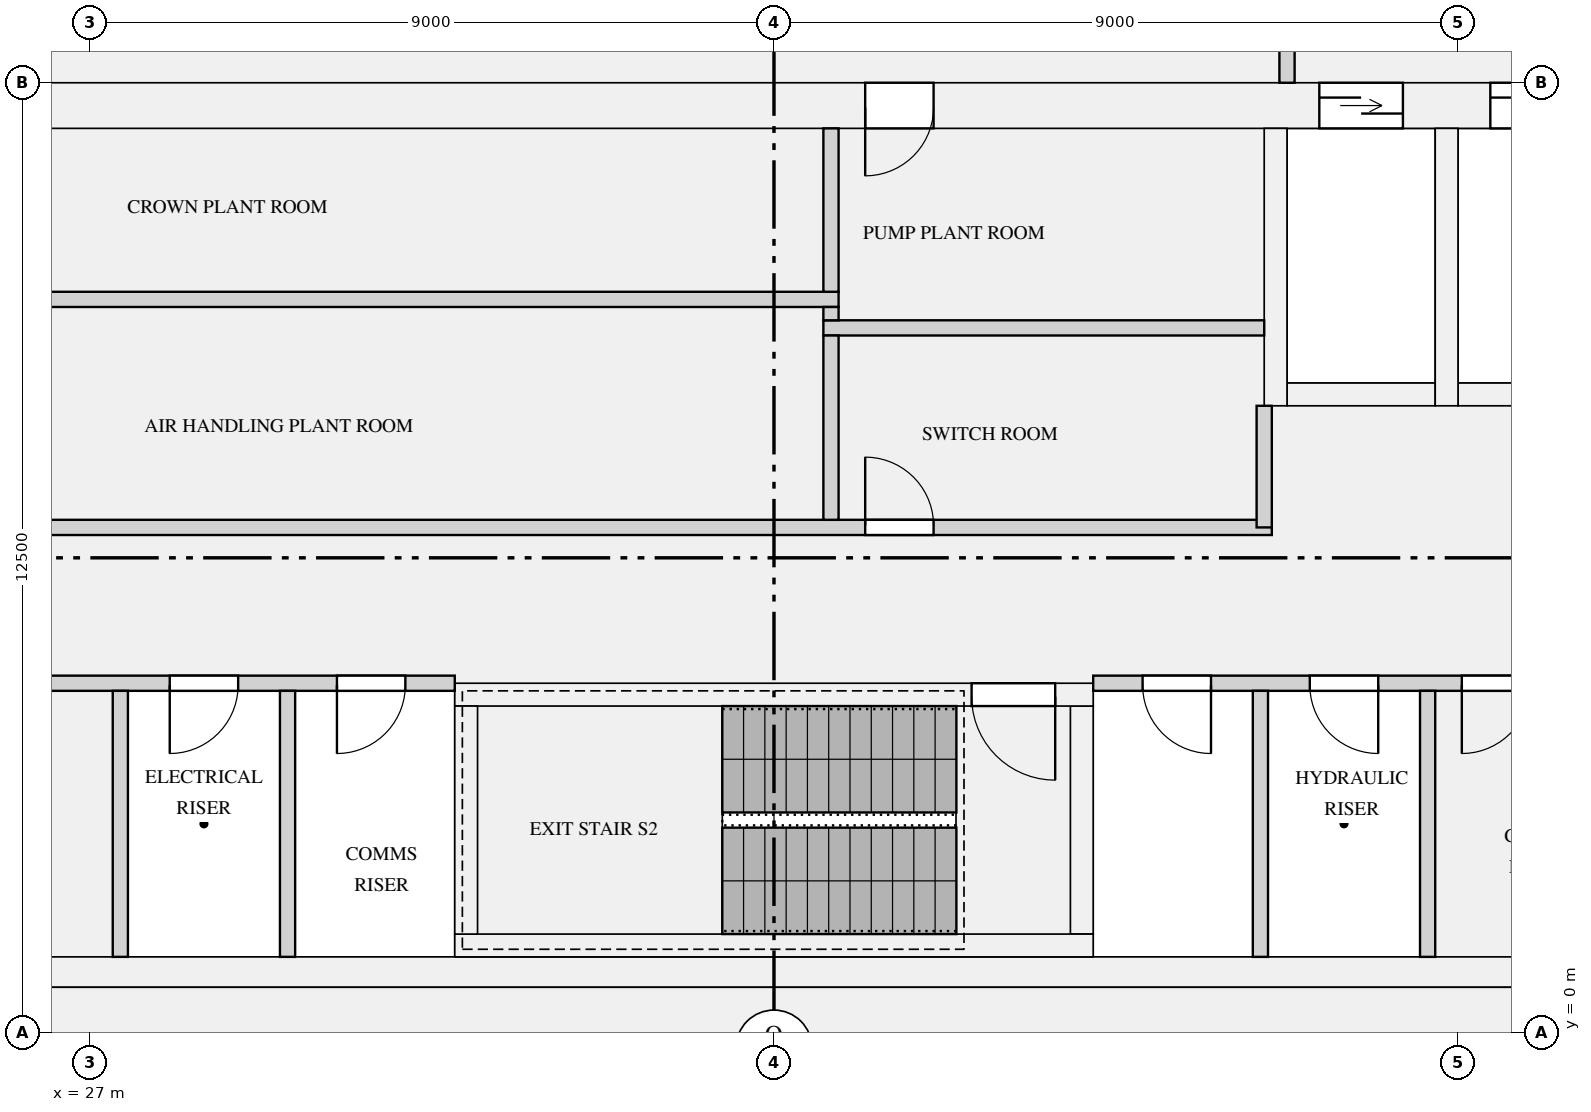
"""IFC4 building model, lengths in metres.
Left out: names, types, materials, properties, quantities, classifications, styles, units other than length and angle.
Written with IfcOpenShell. Run it as: python <this file> out.ifc"""

import sys

from ifc_helpers import new_model, si_unit, direction, frame, frame_2d, origin, place, context, subcontext, project, spatial, rectangle, extrude, element, fill, save


model = new_model("IFC4")
c1 = context("Model", 3, precision=1e-05, world=origin(), true_north=direction((0.0, 1.0)))
c2 = subcontext(c1, "Body", "Model", "MODEL_VIEW")
j1 = project(units=[si_unit("LENGTHUNIT", "METRE"), si_unit("PLANEANGLEUNIT", "RADIAN")], contexts=[c1])
p1 = place(None, origin())
s1 = spatial("IfcSite", under=j1, at=p1, CompositionType="ELEMENT")
p2 = place(p1, origin())
s2 = spatial("IfcBuilding", under=s1, at=p2, CompositionType="ELEMENT")
p3 = place(p2, frame((0.0, 0.0, 235.8)))
s3 = spatial("IfcBuildingStorey", under=s2, at=p3, CompositionType="ELEMENT", Elevation=235.8)
p4 = place(p3, frame((18.6, 0.3, 0.0), z_axis=(0.0, 0.0, 1.0), x_axis=(1.0, 0.0, 0.0)))
e1 = element("IfcWall", 1, at=p4, inside=s3, PredefinedType="SHEAR", context=c2, shape_type="SweptSolid", body=[
    extrude(rectangle(XDim=34.8, YDim=0.6, at=frame_2d((17.4, 0.0))), origin(), (0.0, 0.0, 1.0), 4.2),
])
p5 = place(p3, frame((18.6, 12.2, 0.0), z_axis=(0.0, 0.0, 1.0), x_axis=(1.0, 0.0, 0.0)))
e2 = element("IfcWall", 2, at=p5, inside=s3, PredefinedType="SHEAR", context=c2, shape_type="SweptSolid", body=[
    extrude(rectangle(XDim=34.8, YDim=0.6, at=frame_2d((17.4, 0.0))), origin(), (0.0, 0.0, 1.0), 4.2),
])
p6 = place(p5, frame((24.575, 0.0, 0.0)))
e3 = element("IfcOpeningElement", 3, at=p6, cuts=e2, PredefinedType="OPENING", context=c2, shape_type="SweptSolid", body=[
    extrude(rectangle(XDim=1.1, YDim=2.1, at=frame_2d((0.55, 1.05))), frame((0.0, 0.31, 0.0), z_axis=(0.0, -1.0, 0.0), x_axis=(1.0, 0.0, 0.0)), (0.0, 0.0, 1.0), 0.62),
])
p7 = place(p5, frame((26.825, 0.0, 0.0)))
e4 = element("IfcOpeningElement", 4, at=p7, cuts=e2, PredefinedType="OPENING", context=c2, shape_type="SweptSolid", body=[
    extrude(rectangle(XDim=1.1, YDim=2.1, at=frame_2d((0.55, 1.05))), frame((0.0, 0.31, 0.0), z_axis=(0.0, -1.0, 0.0), x_axis=(1.0, 0.0, 0.0)), (0.0, 0.0, 1.0), 0.62),
])
p8 = place(p5, frame((29.075, 0.0, 0.0)))
e5 = element("IfcOpeningElement", 5, at=p8, cuts=e2, PredefinedType="OPENING", context=c2, shape_type="SweptSolid", body=[
    extrude(rectangle(XDim=1.1, YDim=2.1, at=frame_2d((0.55, 1.05))), frame((0.0, 0.31, 0.0), z_axis=(0.0, -1.0, 0.0), x_axis=(1.0, 0.0, 0.0)), (0.0, 0.0, 1.0), 0.62),
])
p9 = place(p5, frame((18.6, 0.0, 0.0)))
e6 = element("IfcOpeningElement", 6, at=p9, cuts=e2, PredefinedType="OPENING", context=c2, shape_type="SweptSolid", body=[
    extrude(rectangle(XDim=0.9, YDim=2.1, at=frame_2d((0.45, 1.05))), frame((0.0, 0.31, 0.0), z_axis=(0.0, -1.0, 0.0), x_axis=(1.0, 0.0, 0.0)), (0.0, 0.0, 1.0), 0.62),
])
p10 = place(p5, frame((4.65, 0.0, 0.0)))
e7 = element("IfcOpeningElement", 7, at=p10, cuts=e2, PredefinedType="OPENING", context=c2, shape_type="SweptSolid", body=[
    extrude(rectangle(XDim=0.9, YDim=2.1, at=frame_2d((0.45, 1.05))), frame((0.0, 0.31, 0.0), z_axis=(0.0, -1.0, 0.0), x_axis=(1.0, 0.0, 0.0)), (0.0, 0.0, 1.0), 0.62),
])
p11 = place(p5, frame((1.55, 0.0, 0.0)))
e8 = element("IfcOpeningElement", 8, at=p11, cuts=e2, PredefinedType="OPENING", context=c2, shape_type="SweptSolid", body=[
    extrude(rectangle(XDim=1.2, YDim=2.1, at=frame_2d((0.6, 1.05))), frame((0.0, 0.31, 0.0), z_axis=(0.0, -1.0, 0.0), x_axis=(1.0, 0.0, 0.0)), (0.0, 0.0, 1.0), 0.62),
])
p12 = place(p5, frame((32.05, 0.0, 0.0)))
e9 = element("IfcOpeningElement", 9, at=p12, cuts=e2, PredefinedType="OPENING", context=c2, shape_type="SweptSolid", body=[
    extrude(rectangle(XDim=1.2, YDim=2.1, at=frame_2d((0.6, 1.05))), frame((0.0, 0.31, 0.0), z_axis=(0.0, -1.0, 0.0), x_axis=(1.0, 0.0, 0.0)), (0.0, 0.0, 1.0), 0.62),
])
p13 = place(p3, frame((18.6, 0.8, 0.0), z_axis=(0.0, 0.0, 1.0), x_axis=(1.0, 0.0, 0.0)))
e10 = element("IfcWall", 10, at=p13, inside=s3, PredefinedType="SHEAR", context=c2, shape_type="SweptSolid", body=[
    extrude(rectangle(XDim=34.8, YDim=0.4, at=frame_2d((17.4, 0.0))), origin(), (0.0, 0.0, 1.0), 4.2),
])
p14 = place(p3, frame((42.75, 8.4, 0.0), z_axis=(0.0, 0.0, 1.0), x_axis=(1.0, 0.0, 0.0)))
e11 = element("IfcWall", 11, at=p14, inside=s3, PredefinedType="SHEAR", context=c2, shape_type="SweptSolid", body=[
    extrude(rectangle(XDim=1.95, YDim=0.3, at=frame_2d((0.975, 0.0))), origin(), (0.0, 0.0, 1.0), 4.2),
])
p15 = place(p3, frame((42.6, 8.25, 0.0), z_axis=(0.0, 0.0, 1.0), x_axis=(0.0, 1.0, 0.0)))
e12 = element("IfcWall", 12, at=p15, inside=s3, PredefinedType="SHEAR", context=c2, shape_type="SweptSolid", body=[
    extrude(rectangle(XDim=3.65, YDim=0.3, at=frame_2d((1.825, 0.0))), origin(), (0.0, 0.0, 1.0), 4.2),
])
p16 = place(p3, frame((45.0, 8.4, 0.0), z_axis=(0.0, 0.0, 1.0), x_axis=(1.0, 0.0, 0.0)))
e13 = element("IfcWall", 13, at=p16, inside=s3, PredefinedType="SHEAR", context=c2, shape_type="SweptSolid", body=[
    extrude(rectangle(XDim=1.95, YDim=0.3, at=frame_2d((0.975, 0.0))), origin(), (0.0, 0.0, 1.0), 4.2),
])
p17 = place(p3, frame((44.85, 8.25, 0.0), z_axis=(0.0, 0.0, 1.0), x_axis=(0.0, 1.0, 0.0)))
e14 = element("IfcWall", 14, at=p17, inside=s3, PredefinedType="SHEAR", context=c2, shape_type="SweptSolid", body=[
    extrude(rectangle(XDim=3.65, YDim=0.3, at=frame_2d((1.825, 0.0))), origin(), (0.0, 0.0, 1.0), 4.2),
])
p18 = place(p3, frame((31.8, 1.15, 0.0), z_axis=(0.0, 0.0, 1.0), x_axis=(1.0, 0.0, 0.0)))
e15 = element("IfcWall", 15, at=p18, inside=s3, PredefinedType="SHEAR", context=c2, shape_type="SweptSolid", body=[
    extrude(rectangle(XDim=8.4, YDim=0.3, at=frame_2d((4.2, 0.0))), origin(), (0.0, 0.0, 1.0), 4.2),
])
p19 = place(p3, frame((31.8, 4.45, 0.0), z_axis=(0.0, 0.0, 1.0), x_axis=(1.0, 0.0, 0.0)))
e16 = element("IfcWall", 16, at=p19, inside=s3, PredefinedType="SHEAR", context=c2, shape_type="SweptSolid", body=[
    extrude(rectangle(XDim=8.4, YDim=0.3, at=frame_2d((4.2, 0.0))), origin(), (0.0, 0.0, 1.0), 4.2),
])
p20 = place(p19, frame((6.8, 0.0, 0.0)))
e17 = element("IfcOpeningElement", 17, at=p20, cuts=e16, PredefinedType="OPENING", context=c2, shape_type="SweptSolid", body=[
    extrude(rectangle(XDim=1.1, YDim=2.1, at=frame_2d((0.55, 1.05))), frame((0.0, 0.16, 0.0), z_axis=(0.0, -1.0, 0.0), x_axis=(1.0, 0.0, 0.0)), (0.0, 0.0, 1.0), 0.32),
])
for number, where, z_axis, x_axis in (
    (18, (31.95, 1.3, 0.0), (0.0, 0.0, 1.0), (0.0, 1.0, 0.0)),
    (19, (40.05, 1.3, 0.0), (0.0, 0.0, 1.0), (0.0, 1.0, 0.0)),
):
    element("IfcWall", number, at=place(p3, frame(where, z_axis=z_axis, x_axis=x_axis)), inside=s3, PredefinedType="SHEAR", context=c2, shape_type="SweptSolid", body=[
        extrude(rectangle(XDim=3.0, YDim=0.3, at=frame_2d((1.5, 0.0))), origin(), (0.0, 0.0, 1.0), 4.2),
    ])
p21 = place(p3, frame((24.6, 4.6, 0.0), z_axis=(0.0, 0.0, 1.0), x_axis=(1.0, 0.0, 0.0)))
e20 = element("IfcWall", 20, at=p21, inside=s3, PredefinedType="PARTITIONING", context=c2, shape_type="SweptSolid", body=[
    extrude(rectangle(XDim=7.2, YDim=0.2, at=frame_2d((3.6, 0.0))), origin(), (0.0, 0.0, 1.0), 3.85),
])
p22 = place(p21, frame((0.55, 0.0, 0.0)))
e21 = element("IfcOpeningElement", 21, at=p22, cuts=e20, PredefinedType="OPENING", context=c2, shape_type="SweptSolid", body=[
    extrude(rectangle(XDim=0.9, YDim=2.1, at=frame_2d((0.45, 1.05))), frame((0.0, 0.11, 0.0), z_axis=(0.0, -1.0, 0.0), x_axis=(1.0, 0.0, 0.0)), (0.0, 0.0, 1.0), 0.22),
])
p23 = place(p21, frame((3.45, 0.0, 0.0)))
e22 = element("IfcOpeningElement", 22, at=p23, cuts=e20, PredefinedType="OPENING", context=c2, shape_type="SweptSolid", body=[
    extrude(rectangle(XDim=0.9, YDim=2.1, at=frame_2d((0.45, 1.05))), frame((0.0, 0.11, 0.0), z_axis=(0.0, -1.0, 0.0), x_axis=(1.0, 0.0, 0.0)), (0.0, 0.0, 1.0), 0.22),
])
p24 = place(p21, frame((5.65, 0.0, 0.0)))
e23 = element("IfcOpeningElement", 23, at=p24, cuts=e20, PredefinedType="OPENING", context=c2, shape_type="SweptSolid", body=[
    extrude(rectangle(XDim=0.9, YDim=2.1, at=frame_2d((0.45, 1.05))), frame((0.0, 0.11, 0.0), z_axis=(0.0, -1.0, 0.0), x_axis=(1.0, 0.0, 0.0)), (0.0, 0.0, 1.0), 0.22),
])
p25 = place(p3, frame((40.2, 4.6, 0.0), z_axis=(0.0, 0.0, 1.0), x_axis=(1.0, 0.0, 0.0)))
e24 = element("IfcWall", 24, at=p25, inside=s3, PredefinedType="PARTITIONING", context=c2, shape_type="SweptSolid", body=[
    extrude(rectangle(XDim=7.2, YDim=0.2, at=frame_2d((3.6, 0.0))), origin(), (0.0, 0.0, 1.0), 3.85),
])
p26 = place(p25, frame((4.85, 0.0, 0.0)))
e25 = element("IfcOpeningElement", 25, at=p26, cuts=e24, PredefinedType="OPENING", context=c2, shape_type="SweptSolid", body=[
    extrude(rectangle(XDim=0.9, YDim=2.1, at=frame_2d((0.45, 1.05))), frame((0.0, 0.11, 0.0), z_axis=(0.0, -1.0, 0.0), x_axis=(1.0, 0.0, 0.0)), (0.0, 0.0, 1.0), 0.22),
])
p27 = place(p25, frame((0.65, 0.0, 0.0)))
e26 = element("IfcOpeningElement", 26, at=p27, cuts=e24, PredefinedType="OPENING", context=c2, shape_type="SweptSolid", body=[
    extrude(rectangle(XDim=0.9, YDim=2.1, at=frame_2d((0.45, 1.05))), frame((0.0, 0.11, 0.0), z_axis=(0.0, -1.0, 0.0), x_axis=(1.0, 0.0, 0.0)), (0.0, 0.0, 1.0), 0.22),
])
p28 = place(p25, frame((2.85, 0.0, 0.0)))
e27 = element("IfcOpeningElement", 27, at=p28, cuts=e24, PredefinedType="OPENING", context=c2, shape_type="SweptSolid", body=[
    extrude(rectangle(XDim=0.9, YDim=2.1, at=frame_2d((0.45, 1.05))), frame((0.0, 0.11, 0.0), z_axis=(0.0, -1.0, 0.0), x_axis=(1.0, 0.0, 0.0)), (0.0, 0.0, 1.0), 0.22),
])
p29 = place(p3, frame((22.7, 6.65, 0.0), z_axis=(0.0, 0.0, 1.0), x_axis=(1.0, 0.0, 0.0)))
e28 = element("IfcWall", 28, at=p29, inside=s3, PredefinedType="PARTITIONING", context=c2, shape_type="SweptSolid", body=[
    extrude(rectangle(XDim=19.85, YDim=0.2, at=frame_2d((9.925, 0.0))), origin(), (0.0, 0.0, 1.0), 3.85),
])
p30 = place(p29, frame((14.5, 0.0, 0.0)))
e29 = element("IfcOpeningElement", 29, at=p30, cuts=e28, PredefinedType="OPENING", context=c2, shape_type="SweptSolid", body=[
    extrude(rectangle(XDim=0.9, YDim=2.1, at=frame_2d((0.45, 1.05))), frame((0.0, 0.11, 0.0), z_axis=(0.0, -1.0, 0.0), x_axis=(1.0, 0.0, 0.0)), (0.0, 0.0, 1.0), 0.22),
])
p31 = place(p29, frame((0.55, 0.0, 0.0)))
e30 = element("IfcOpeningElement", 30, at=p31, cuts=e28, PredefinedType="OPENING", context=c2, shape_type="SweptSolid", body=[
    extrude(rectangle(XDim=0.9, YDim=2.1, at=frame_2d((0.45, 1.05))), frame((0.0, 0.11, 0.0), z_axis=(0.0, -1.0, 0.0), x_axis=(1.0, 0.0, 0.0)), (0.0, 0.0, 1.0), 0.22),
])
p32 = place(p3, frame((36.65, 9.275, 0.0), z_axis=(0.0, 0.0, 1.0), x_axis=(1.0, 0.0, 0.0)))
e31 = element("IfcWall", 31, at=p32, inside=s3, PredefinedType="PARTITIONING", context=c2, shape_type="SweptSolid", body=[
    extrude(rectangle(XDim=5.8, YDim=0.2, at=frame_2d((2.9, 0.0))), origin(), (0.0, 0.0, 1.0), 3.85),
])
p33 = place(p3, frame((22.7, 9.65, 0.0), z_axis=(0.0, 0.0, 1.0), x_axis=(1.0, 0.0, 0.0)))
e32 = element("IfcWall", 32, at=p33, inside=s3, PredefinedType="PARTITIONING", context=c2, shape_type="SweptSolid", body=[
    extrude(rectangle(XDim=14.15, YDim=0.2, at=frame_2d((7.075, 0.0))), origin(), (0.0, 0.0, 1.0), 3.85),
])
for number, where, z_axis, x_axis in (
    (33, (27.4, 1.0, 0.0), (0.0, 0.0, 1.0), (0.0, 1.0, 0.0)),
    (34, (29.6, 1.0, 0.0), (0.0, 0.0, 1.0), (0.0, 1.0, 0.0)),
    (35, (42.4, 1.0, 0.0), (0.0, 0.0, 1.0), (0.0, 1.0, 0.0)),
    (36, (44.6, 1.0, 0.0), (0.0, 0.0, 1.0), (0.0, 1.0, 0.0)),
):
    element("IfcWall", number, at=place(p3, frame(where, z_axis=z_axis, x_axis=x_axis)), inside=s3, PredefinedType="PARTITIONING", context=c2, shape_type="SweptSolid", body=[
        extrude(rectangle(XDim=3.5, YDim=0.2, at=frame_2d((1.75, 0.0))), origin(), (0.0, 0.0, 1.0), 3.85),
    ])
p34 = place(p3, frame((42.45, 6.65, 0.0), z_axis=(0.0, 0.0, 1.0), x_axis=(0.0, 1.0, 0.0)))
e37 = element("IfcWall", 37, at=p34, inside=s3, PredefinedType="PARTITIONING", context=c2, shape_type="SweptSolid", body=[
    extrude(rectangle(XDim=1.6, YDim=0.2, at=frame_2d((0.8, 0.0))), origin(), (0.0, 0.0, 1.0), 3.85),
])
p35 = place(p3, frame((36.75, 6.75, 0.0), z_axis=(0.0, 0.0, 1.0), x_axis=(0.0, 1.0, 0.0)))
e38 = element("IfcWall", 38, at=p35, inside=s3, PredefinedType="PARTITIONING", context=c2, shape_type="SweptSolid", body=[
    extrude(rectangle(XDim=2.425, YDim=0.2, at=frame_2d((1.212, 0.0))), origin(), (0.0, 0.0, 1.0), 3.85),
])
p36 = place(p3, frame((36.75, 9.375, 0.0), z_axis=(0.0, 0.0, 1.0), x_axis=(0.0, 1.0, 0.0)))
e39 = element("IfcWall", 39, at=p36, inside=s3, PredefinedType="PARTITIONING", context=c2, shape_type="SweptSolid", body=[
    extrude(rectangle(XDim=0.175, YDim=0.2, at=frame_2d((0.087, 0.0))), origin(), (0.0, 0.0, 1.0), 3.85),
])
p37 = place(p3, frame((36.75, 9.75, 0.0), z_axis=(0.0, 0.0, 1.0), x_axis=(0.0, 1.0, 0.0)))
e40 = element("IfcWall", 40, at=p37, inside=s3, PredefinedType="PARTITIONING", context=c2, shape_type="SweptSolid", body=[
    extrude(rectangle(XDim=2.15, YDim=0.2, at=frame_2d((1.075, 0.0))), origin(), (0.0, 0.0, 1.0), 3.85),
])
p38 = place(p3, frame((42.75, 12.5, 0.0), z_axis=(0.0, 0.0, 1.0), x_axis=(0.0, 1.0, 0.0)))
e41 = element("IfcWall", 41, at=p38, inside=s3, PredefinedType="PARTITIONING", context=c2, shape_type="SweptSolid", body=[
    extrude(rectangle(XDim=3.4, YDim=0.2, at=frame_2d((1.7, 0.0))), origin(), (0.0, 0.0, 1.0), 3.85),
])
p39 = place(p38, frame((2.2, 0.0, 0.0)))
e42 = element("IfcOpeningElement", 42, at=p39, cuts=e41, PredefinedType="OPENING", context=c2, shape_type="SweptSolid", body=[
    extrude(rectangle(XDim=1.0, YDim=2.1, at=frame_2d((0.5, 1.05))), frame((0.0, 0.11, 0.0), z_axis=(0.0, -1.0, 0.0), x_axis=(1.0, 0.0, 0.0)), (0.0, 0.0, 1.0), 0.22),
])
p40 = place(p6, origin())
e43 = element("IfcDoor", 43, at=p40, inside=s3, OperationType="DOUBLE_DOOR_SLIDING", PredefinedType="DOOR", context=c2, shape_type="SweptSolid", body=[
    extrude(rectangle(XDim=1.1, YDim=2.1, at=frame_2d((0.55, 1.05))), frame((0.0, 0.025, 0.0), z_axis=(0.0, -1.0, 0.0), x_axis=(1.0, 0.0, 0.0)), (0.0, 0.0, 1.0), 0.05),
])
fill(e3, e43)
p41 = place(p7, origin())
e44 = element("IfcDoor", 44, at=p41, inside=s3, OperationType="DOUBLE_DOOR_SLIDING", PredefinedType="DOOR", context=c2, shape_type="SweptSolid", body=[
    extrude(rectangle(XDim=1.1, YDim=2.1, at=frame_2d((0.55, 1.05))), frame((0.0, 0.025, 0.0), z_axis=(0.0, -1.0, 0.0), x_axis=(1.0, 0.0, 0.0)), (0.0, 0.0, 1.0), 0.05),
])
fill(e4, e44)
p42 = place(p20, frame((1.1, 0.0, 0.0), z_axis=(0.0, 0.0, 1.0), x_axis=(-1.0, 0.0, 0.0)))
e45 = element("IfcDoor", 45, at=p42, inside=s3, OperationType="SINGLE_SWING_LEFT", PredefinedType="DOOR", context=c2, shape_type="SweptSolid", body=[
    extrude(rectangle(XDim=1.1, YDim=2.1, at=frame_2d((0.55, 1.05))), frame((0.0, 0.025, 0.0), z_axis=(0.0, -1.0, 0.0), x_axis=(1.0, 0.0, 0.0)), (0.0, 0.0, 1.0), 0.05),
])
fill(e17, e45)
p43 = place(p26, frame((0.9, 0.0, 0.0), z_axis=(0.0, 0.0, 1.0), x_axis=(-1.0, 0.0, 0.0)))
e46 = element("IfcDoor", 46, at=p43, inside=s3, OperationType="SINGLE_SWING_RIGHT", PredefinedType="DOOR", context=c2, shape_type="SweptSolid", body=[
    extrude(rectangle(XDim=0.9, YDim=2.1, at=frame_2d((0.45, 1.05))), frame((0.0, 0.025, 0.0), z_axis=(0.0, -1.0, 0.0), x_axis=(1.0, 0.0, 0.0)), (0.0, 0.0, 1.0), 0.05),
])
fill(e25, e46)
p44 = place(p30, origin())
e47 = element("IfcDoor", 47, at=p44, inside=s3, OperationType="SINGLE_SWING_LEFT", PredefinedType="DOOR", context=c2, shape_type="SweptSolid", body=[
    extrude(rectangle(XDim=0.9, YDim=2.1, at=frame_2d((0.45, 1.05))), frame((0.0, 0.025, 0.0), z_axis=(0.0, -1.0, 0.0), x_axis=(1.0, 0.0, 0.0)), (0.0, 0.0, 1.0), 0.05),
])
fill(e29, e47)
p45 = place(p9, frame((0.9, 0.0, 0.0), z_axis=(0.0, 0.0, 1.0), x_axis=(-1.0, 0.0, 0.0)))
e48 = element("IfcDoor", 48, at=p45, inside=s3, OperationType="SINGLE_SWING_RIGHT", PredefinedType="DOOR", context=c2, shape_type="SweptSolid", body=[
    extrude(rectangle(XDim=0.9, YDim=2.1, at=frame_2d((0.45, 1.05))), frame((0.0, 0.025, 0.0), z_axis=(0.0, -1.0, 0.0), x_axis=(1.0, 0.0, 0.0)), (0.0, 0.0, 1.0), 0.05),
])
fill(e6, e48)
p46 = place(p23, frame((0.9, 0.0, 0.0), z_axis=(0.0, 0.0, 1.0), x_axis=(-1.0, 0.0, 0.0)))
e49 = element("IfcDoor", 49, at=p46, inside=s3, OperationType="SINGLE_SWING_RIGHT", PredefinedType="DOOR", context=c2, shape_type="SweptSolid", body=[
    extrude(rectangle(XDim=0.9, YDim=2.1, at=frame_2d((0.45, 1.05))), frame((0.0, 0.025, 0.0), z_axis=(0.0, -1.0, 0.0), x_axis=(1.0, 0.0, 0.0)), (0.0, 0.0, 1.0), 0.05),
])
fill(e22, e49)
p47 = place(p24, frame((0.9, 0.0, 0.0), z_axis=(0.0, 0.0, 1.0), x_axis=(-1.0, 0.0, 0.0)))
e50 = element("IfcDoor", 50, at=p47, inside=s3, OperationType="SINGLE_SWING_RIGHT", PredefinedType="DOOR", context=c2, shape_type="SweptSolid", body=[
    extrude(rectangle(XDim=0.9, YDim=2.1, at=frame_2d((0.45, 1.05))), frame((0.0, 0.025, 0.0), z_axis=(0.0, -1.0, 0.0), x_axis=(1.0, 0.0, 0.0)), (0.0, 0.0, 1.0), 0.05),
])
fill(e23, e50)
p48 = place(p27, frame((0.9, 0.0, 0.0), z_axis=(0.0, 0.0, 1.0), x_axis=(-1.0, 0.0, 0.0)))
e51 = element("IfcDoor", 51, at=p48, inside=s3, OperationType="SINGLE_SWING_LEFT", PredefinedType="DOOR", context=c2, shape_type="SweptSolid", body=[
    extrude(rectangle(XDim=0.9, YDim=2.1, at=frame_2d((0.45, 1.05))), frame((0.0, 0.025, 0.0), z_axis=(0.0, -1.0, 0.0), x_axis=(1.0, 0.0, 0.0)), (0.0, 0.0, 1.0), 0.05),
])
fill(e26, e51)
p49 = place(p28, frame((0.9, 0.0, 0.0), z_axis=(0.0, 0.0, 1.0), x_axis=(-1.0, 0.0, 0.0)))
e52 = element("IfcDoor", 52, at=p49, inside=s3, OperationType="SINGLE_SWING_LEFT", PredefinedType="DOOR", context=c2, shape_type="SweptSolid", body=[
    extrude(rectangle(XDim=0.9, YDim=2.1, at=frame_2d((0.45, 1.05))), frame((0.0, 0.025, 0.0), z_axis=(0.0, -1.0, 0.0), x_axis=(1.0, 0.0, 0.0)), (0.0, 0.0, 1.0), 0.05),
])
fill(e27, e52)
save(model, sys.argv[1])
